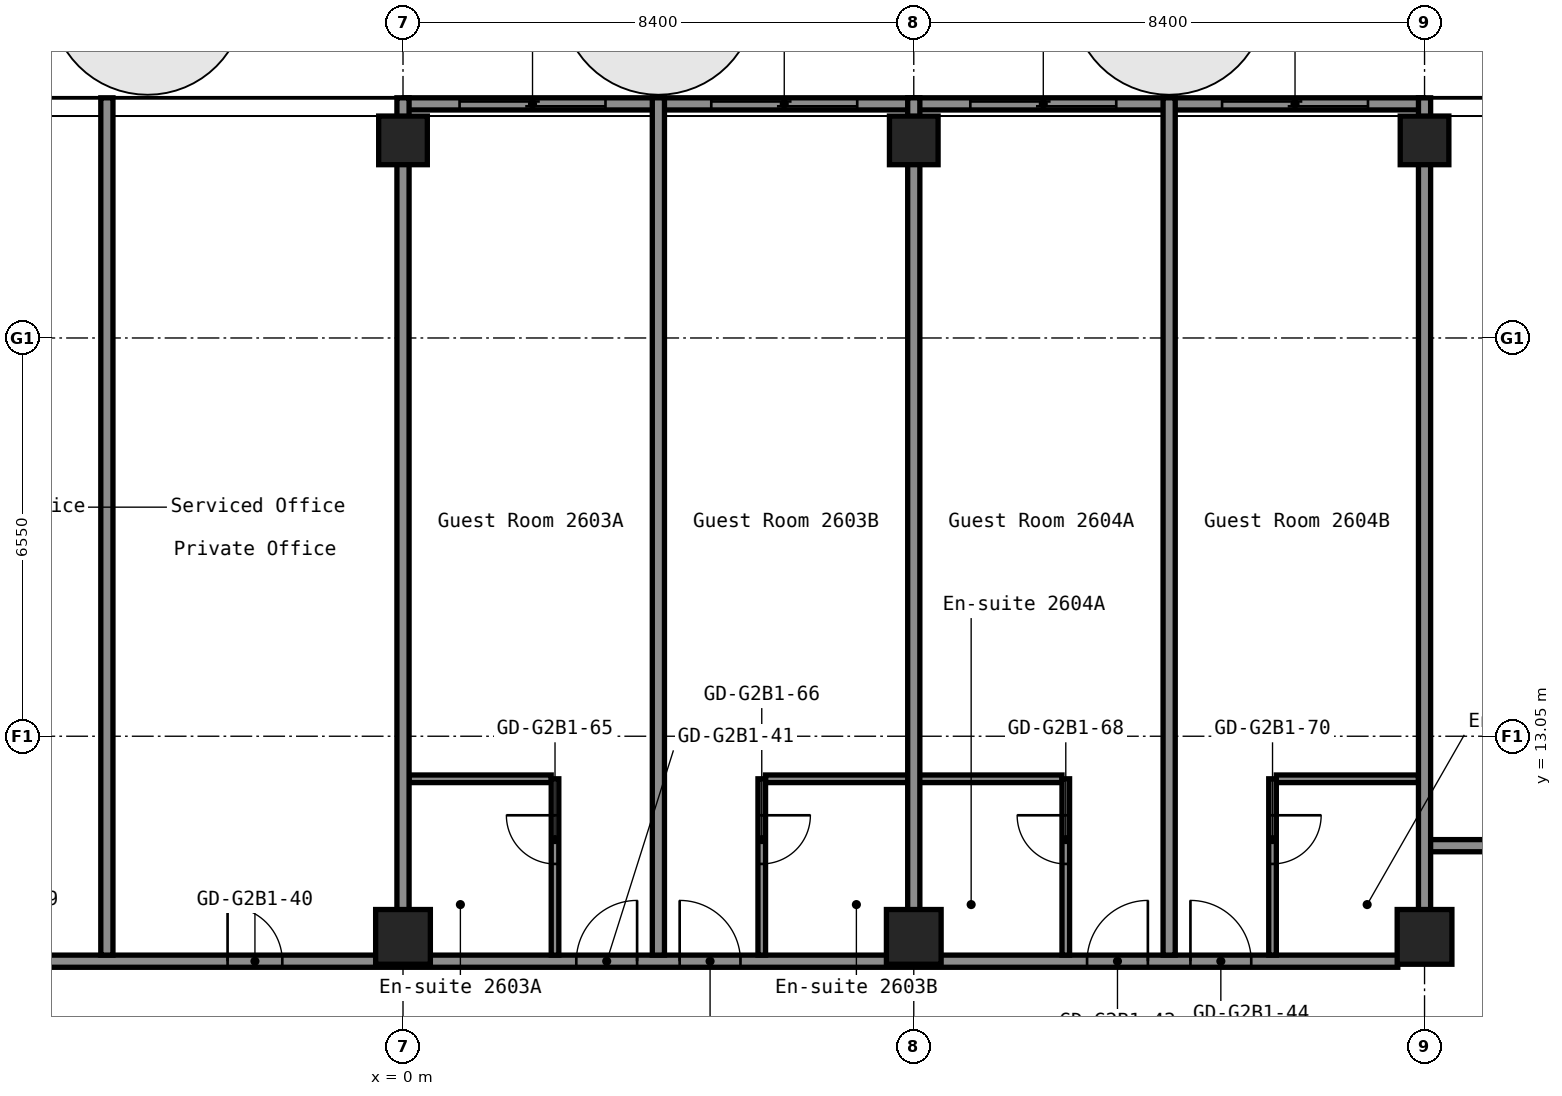
"""IFC4 building model, lengths in metres.
Left out: names, types, materials, properties, quantities, classifications, styles, units other than length and angle.
Written with IfcOpenShell. Run it as: python <this file> out.ifc"""

import sys

from ifc_helpers import new_model, si_unit, direction, frame, frame_2d, origin, origin_2d, place, context, subcontext, project, spatial, rectangle, hollow_rectangle, extrude, element, fill, save


model = new_model("IFC4")
c1 = context("Model", 3, precision=1e-05, world=origin(), true_north=direction((0.0, 1.0)))
c2 = subcontext(c1, "Body", "Model", "MODEL_VIEW")
j1 = project(units=[si_unit("LENGTHUNIT", "METRE"), si_unit("PLANEANGLEUNIT", "RADIAN")], contexts=[c1])
p1 = place(None, origin())
s1 = spatial("IfcSite", under=j1, at=p1, CompositionType="ELEMENT")
p2 = place(p1, origin())
s2 = spatial("IfcBuilding", under=s1, at=p2, CompositionType="ELEMENT")
p3 = place(p2, frame((0.0, 0.0, 94.6)))
s3 = spatial("IfcBuildingStorey", under=s2, at=p3, CompositionType="ELEMENT", Elevation=94.6)
p4 = place(p3, frame((0.0, 9.75, 0.0), z_axis=(0.0, 0.0, 1.0), x_axis=(1.0, 0.0, 0.0)))
e1 = element("IfcColumn", 1, at=p4, inside=s3, PredefinedType="COLUMN", context=c2, shape_type="SweptSolid", body=[
    extrude(hollow_rectangle(XDim=0.9, YDim=0.9, WallThickness=0.036, at=origin_2d()), origin(), (0.0, 0.0, 1.0), 2.8),
])
p5 = place(p3, frame((0.0, 22.85, 0.0), z_axis=(0.0, 0.0, 1.0), x_axis=(1.0, 0.0, 0.0)))
e2 = element("IfcColumn", 2, at=p5, inside=s3, PredefinedType="COLUMN", context=c2, shape_type="SweptSolid", body=[
    extrude(hollow_rectangle(XDim=0.8, YDim=0.8, WallThickness=0.032, at=origin_2d()), origin(), (0.0, 0.0, 1.0), 2.8),
])
p6 = place(p3, frame((8.4, 9.75, 0.0), z_axis=(0.0, 0.0, 1.0), x_axis=(1.0, 0.0, 0.0)))
e3 = element("IfcColumn", 3, at=p6, inside=s3, PredefinedType="COLUMN", context=c2, shape_type="SweptSolid", body=[
    extrude(hollow_rectangle(XDim=0.9, YDim=0.9, WallThickness=0.036, at=origin_2d()), origin(), (0.0, 0.0, 1.0), 2.8),
])
p7 = place(p3, frame((8.4, 22.85, 0.0), z_axis=(0.0, 0.0, 1.0), x_axis=(1.0, 0.0, 0.0)))
e4 = element("IfcColumn", 4, at=p7, inside=s3, PredefinedType="COLUMN", context=c2, shape_type="SweptSolid", body=[
    extrude(hollow_rectangle(XDim=0.8, YDim=0.8, WallThickness=0.032, at=origin_2d()), origin(), (0.0, 0.0, 1.0), 2.8),
])
p8 = place(p3, frame((16.8, 9.75, 0.0), z_axis=(0.0, 0.0, 1.0), x_axis=(1.0, 0.0, 0.0)))
e5 = element("IfcColumn", 5, at=p8, inside=s3, PredefinedType="COLUMN", context=c2, shape_type="SweptSolid", body=[
    extrude(hollow_rectangle(XDim=0.9, YDim=0.9, WallThickness=0.036, at=origin_2d()), origin(), (0.0, 0.0, 1.0), 2.8),
])
p9 = place(p3, frame((16.8, 22.85, 0.0), z_axis=(0.0, 0.0, 1.0), x_axis=(1.0, 0.0, 0.0)))
e6 = element("IfcColumn", 6, at=p9, inside=s3, PredefinedType="COLUMN", context=c2, shape_type="SweptSolid", body=[
    extrude(hollow_rectangle(XDim=0.8, YDim=0.8, WallThickness=0.032, at=origin_2d()), origin(), (0.0, 0.0, 1.0), 2.8),
])
p10 = place(p3, frame((-16.36, 9.35, 0.0), z_axis=(0.0, 0.0, 1.0), x_axis=(1.0, 0.0, 0.0)))
e7 = element("IfcWall", 7, at=p10, inside=s3, PredefinedType="PARTITIONING", context=c2, shape_type="SweptSolid", body=[
    extrude(rectangle(XDim=32.72, YDim=0.2, at=frame_2d((16.36, 0.0))), origin(), (0.0, 0.0, 1.0), 2.8),
])
p11 = place(p10, frame((1.8, 0.0, 0.0)))
e8 = element("IfcOpeningElement", 8, at=p11, cuts=e7, PredefinedType="OPENING", context=c2, shape_type="SweptSolid", body=[
    extrude(rectangle(XDim=0.9, YDim=2.1, at=frame_2d((0.45, 1.05))), frame((0.0, 0.11, 0.0), z_axis=(0.0, -1.0, 0.0), x_axis=(1.0, 0.0, 0.0)), (0.0, 0.0, 1.0), 0.22),
])
p12 = place(p10, frame((6.0, 0.0, 0.0)))
e9 = element("IfcOpeningElement", 9, at=p12, cuts=e7, PredefinedType="OPENING", context=c2, shape_type="SweptSolid", body=[
    extrude(rectangle(XDim=0.9, YDim=2.1, at=frame_2d((0.45, 1.05))), frame((0.0, 0.11, 0.0), z_axis=(0.0, -1.0, 0.0), x_axis=(1.0, 0.0, 0.0)), (0.0, 0.0, 1.0), 0.22),
])
p13 = place(p10, frame((9.275, 0.0, 0.0)))
e10 = element("IfcOpeningElement", 10, at=p13, cuts=e7, PredefinedType="OPENING", context=c2, shape_type="SweptSolid", body=[
    extrude(rectangle(XDim=0.9, YDim=2.1, at=frame_2d((0.45, 1.05))), frame((0.0, 0.11, 0.0), z_axis=(0.0, -1.0, 0.0), x_axis=(1.0, 0.0, 0.0)), (0.0, 0.0, 1.0), 0.22),
])
p14 = place(p10, frame((13.475, 0.0, 0.0)))
e11 = element("IfcOpeningElement", 11, at=p14, cuts=e7, PredefinedType="OPENING", context=c2, shape_type="SweptSolid", body=[
    extrude(rectangle(XDim=0.9, YDim=2.1, at=frame_2d((0.45, 1.05))), frame((0.0, 0.11, 0.0), z_axis=(0.0, -1.0, 0.0), x_axis=(1.0, 0.0, 0.0)), (0.0, 0.0, 1.0), 0.22),
])
p15 = place(p10, frame((19.21, 0.0, 0.0)))
e12 = element("IfcOpeningElement", 12, at=p15, cuts=e7, PredefinedType="OPENING", context=c2, shape_type="SweptSolid", body=[
    extrude(rectangle(XDim=1.0, YDim=2.1, at=frame_2d((0.5, 1.05))), frame((0.0, 0.11, 0.0), z_axis=(0.0, -1.0, 0.0), x_axis=(1.0, 0.0, 0.0)), (0.0, 0.0, 1.0), 0.22),
])
p16 = place(p10, frame((20.91, 0.0, 0.0)))
e13 = element("IfcOpeningElement", 13, at=p16, cuts=e7, PredefinedType="OPENING", context=c2, shape_type="SweptSolid", body=[
    extrude(rectangle(XDim=1.0, YDim=2.1, at=frame_2d((0.5, 1.05))), frame((0.0, 0.11, 0.0), z_axis=(0.0, -1.0, 0.0), x_axis=(1.0, 0.0, 0.0)), (0.0, 0.0, 1.0), 0.22),
])
p17 = place(p10, frame((27.61, 0.0, 0.0)))
e14 = element("IfcOpeningElement", 14, at=p17, cuts=e7, PredefinedType="OPENING", context=c2, shape_type="SweptSolid", body=[
    extrude(rectangle(XDim=1.0, YDim=2.1, at=frame_2d((0.5, 1.05))), frame((0.0, 0.11, 0.0), z_axis=(0.0, -1.0, 0.0), x_axis=(1.0, 0.0, 0.0)), (0.0, 0.0, 1.0), 0.22),
])
p18 = place(p10, frame((29.31, 0.0, 0.0)))
e15 = element("IfcOpeningElement", 15, at=p18, cuts=e7, PredefinedType="OPENING", context=c2, shape_type="SweptSolid", body=[
    extrude(rectangle(XDim=1.0, YDim=2.1, at=frame_2d((0.5, 1.05))), frame((0.0, 0.11, 0.0), z_axis=(0.0, -1.0, 0.0), x_axis=(1.0, 0.0, 0.0)), (0.0, 0.0, 1.0), 0.22),
])
p19 = place(p3, frame((16.8, 11.25, 0.0), z_axis=(0.0, 0.0, 1.0), x_axis=(1.0, 0.0, 0.0)))
e16 = element("IfcWall", 16, at=p19, inside=s3, PredefinedType="PARTITIONING", context=c2, shape_type="SweptSolid", body=[
    extrude(rectangle(XDim=29.7, YDim=0.2, at=frame_2d((14.85, 0.0))), origin(), (0.0, 0.0, 1.0), 2.8),
])
p20 = place(p19, frame((3.4, 0.0, 0.0)))
e17 = element("IfcOpeningElement", 17, at=p20, cuts=e16, PredefinedType="OPENING", context=c2, shape_type="SweptSolid", body=[
    extrude(rectangle(XDim=1.6, YDim=2.1, at=frame_2d((0.8, 1.05))), frame((0.0, 0.11, 0.0), z_axis=(0.0, -1.0, 0.0), x_axis=(1.0, 0.0, 0.0)), (0.0, 0.0, 1.0), 0.22),
])
p21 = place(p19, frame((11.8, 0.0, 0.0)))
e18 = element("IfcOpeningElement", 18, at=p21, cuts=e16, PredefinedType="OPENING", context=c2, shape_type="SweptSolid", body=[
    extrude(rectangle(XDim=1.6, YDim=2.1, at=frame_2d((0.8, 1.05))), frame((0.0, 0.11, 0.0), z_axis=(0.0, -1.0, 0.0), x_axis=(1.0, 0.0, 0.0)), (0.0, 0.0, 1.0), 0.22),
])
p22 = place(p19, frame((20.2, 0.0, 0.0)))
e19 = element("IfcOpeningElement", 19, at=p22, cuts=e16, PredefinedType="OPENING", context=c2, shape_type="SweptSolid", body=[
    extrude(rectangle(XDim=1.6, YDim=2.1, at=frame_2d((0.8, 1.05))), frame((0.0, 0.11, 0.0), z_axis=(0.0, -1.0, 0.0), x_axis=(1.0, 0.0, 0.0)), (0.0, 0.0, 1.0), 0.22),
])
p23 = place(p19, frame((26.85, 0.0, 0.0)))
e20 = element("IfcOpeningElement", 20, at=p23, cuts=e16, PredefinedType="OPENING", context=c2, shape_type="SweptSolid", body=[
    extrude(rectangle(XDim=0.9, YDim=2.1, at=frame_2d((0.45, 1.05))), frame((0.0, 0.11, 0.0), z_axis=(0.0, -1.0, 0.0), x_axis=(1.0, 0.0, 0.0)), (0.0, 0.0, 1.0), 0.22),
])
p24 = place(p3, frame((0.1, 12.35, 0.0), z_axis=(0.0, 0.0, 1.0), x_axis=(1.0, 0.0, 0.0)))
e21 = element("IfcWall", 21, at=p24, inside=s3, PredefinedType="PARTITIONING", context=c2, shape_type="SweptSolid", body=[
    extrude(rectangle(XDim=2.337, YDim=0.125, at=frame_2d((1.169, 0.0))), origin(), (0.0, 0.0, 1.0), 2.8),
])
p25 = place(p3, frame((5.962, 12.35, 0.0), z_axis=(0.0, 0.0, 1.0), x_axis=(1.0, 0.0, 0.0)))
e22 = element("IfcWall", 22, at=p25, inside=s3, PredefinedType="PARTITIONING", context=c2, shape_type="SweptSolid", body=[
    extrude(rectangle(XDim=4.875, YDim=0.125, at=frame_2d((2.438, 0.0))), origin(), (0.0, 0.0, 1.0), 2.8),
])
p26 = place(p3, frame((14.363, 12.35, 0.0), z_axis=(0.0, 0.0, 1.0), x_axis=(1.0, 0.0, 0.0)))
e23 = element("IfcWall", 23, at=p26, inside=s3, PredefinedType="PARTITIONING", context=c2, shape_type="SweptSolid", body=[
    extrude(rectangle(XDim=2.337, YDim=0.125, at=frame_2d((1.169, 0.0))), origin(), (0.0, 0.0, 1.0), 2.8),
])
p27 = place(p3, frame((-4.87, 9.45, 0.0), z_axis=(0.0, 0.0, 1.0), x_axis=(0.0, 1.0, 0.0)))
e24 = element("IfcWall", 24, at=p27, inside=s3, PredefinedType="PARTITIONING", context=c2, shape_type="SweptSolid", body=[
    extrude(rectangle(XDim=14.1, YDim=0.2, at=frame_2d((7.05, 0.0))), origin(), (0.0, 0.0, 1.0), 2.8),
])
p28 = place(p3, frame((0.0, 10.19, 0.0), z_axis=(0.0, 0.0, 1.0), x_axis=(0.0, 1.0, 0.0)))
e25 = element("IfcWall", 25, at=p28, inside=s3, PredefinedType="PARTITIONING", context=c2, shape_type="SweptSolid", body=[
    extrude(rectangle(XDim=13.36, YDim=0.2, at=frame_2d((6.68, 0.0))), origin(), (0.0, 0.0, 1.0), 2.8),
])
p29 = place(p3, frame((2.5, 9.45, 0.0), z_axis=(0.0, 0.0, 1.0), x_axis=(0.0, 1.0, 0.0)))
e26 = element("IfcWall", 26, at=p29, inside=s3, PredefinedType="PARTITIONING", context=c2, shape_type="SweptSolid", body=[
    extrude(rectangle(XDim=2.9, YDim=0.125, at=frame_2d((1.45, 0.0))), origin(), (0.0, 0.0, 1.0), 2.8),
])
p30 = place(p29, frame((1.5, 0.0, 0.0)))
e27 = element("IfcOpeningElement", 27, at=p30, cuts=e26, PredefinedType="OPENING", context=c2, shape_type="SweptSolid", body=[
    extrude(rectangle(XDim=0.8, YDim=2.1, at=frame_2d((0.4, 1.05))), frame((0.0, 0.073, 0.0), z_axis=(0.0, -1.0, 0.0), x_axis=(1.0, 0.0, 0.0)), (0.0, 0.0, 1.0), 0.145),
])
p31 = place(p3, frame((4.2, 9.45, 0.0), z_axis=(0.0, 0.0, 1.0), x_axis=(0.0, 1.0, 0.0)))
e28 = element("IfcWall", 28, at=p31, inside=s3, PredefinedType="PARTITIONING", context=c2, shape_type="SweptSolid", body=[
    extrude(rectangle(XDim=14.1, YDim=0.2, at=frame_2d((7.05, 0.0))), origin(), (0.0, 0.0, 1.0), 2.8),
])
p32 = place(p3, frame((5.9, 9.45, 0.0), z_axis=(0.0, 0.0, 1.0), x_axis=(0.0, 1.0, 0.0)))
e29 = element("IfcWall", 29, at=p32, inside=s3, PredefinedType="PARTITIONING", context=c2, shape_type="SweptSolid", body=[
    extrude(rectangle(XDim=2.9, YDim=0.125, at=frame_2d((1.45, 0.0))), origin(), (0.0, 0.0, 1.0), 2.8),
])
p33 = place(p32, frame((1.5, 0.0, 0.0)))
e30 = element("IfcOpeningElement", 30, at=p33, cuts=e29, PredefinedType="OPENING", context=c2, shape_type="SweptSolid", body=[
    extrude(rectangle(XDim=0.8, YDim=2.1, at=frame_2d((0.4, 1.05))), frame((0.0, 0.073, 0.0), z_axis=(0.0, -1.0, 0.0), x_axis=(1.0, 0.0, 0.0)), (0.0, 0.0, 1.0), 0.145),
])
p34 = place(p3, frame((8.4, 10.19, 0.0), z_axis=(0.0, 0.0, 1.0), x_axis=(0.0, 1.0, 0.0)))
e31 = element("IfcWall", 31, at=p34, inside=s3, PredefinedType="PARTITIONING", context=c2, shape_type="SweptSolid", body=[
    extrude(rectangle(XDim=13.36, YDim=0.2, at=frame_2d((6.68, 0.0))), origin(), (0.0, 0.0, 1.0), 2.8),
])
p35 = place(p3, frame((10.9, 9.45, 0.0), z_axis=(0.0, 0.0, 1.0), x_axis=(0.0, 1.0, 0.0)))
e32 = element("IfcWall", 32, at=p35, inside=s3, PredefinedType="PARTITIONING", context=c2, shape_type="SweptSolid", body=[
    extrude(rectangle(XDim=2.9, YDim=0.125, at=frame_2d((1.45, 0.0))), origin(), (0.0, 0.0, 1.0), 2.8),
])
p36 = place(p35, frame((1.5, 0.0, 0.0)))
e33 = element("IfcOpeningElement", 33, at=p36, cuts=e32, PredefinedType="OPENING", context=c2, shape_type="SweptSolid", body=[
    extrude(rectangle(XDim=0.8, YDim=2.1, at=frame_2d((0.4, 1.05))), frame((0.0, 0.073, 0.0), z_axis=(0.0, -1.0, 0.0), x_axis=(1.0, 0.0, 0.0)), (0.0, 0.0, 1.0), 0.145),
])
p37 = place(p3, frame((12.6, 9.45, 0.0), z_axis=(0.0, 0.0, 1.0), x_axis=(0.0, 1.0, 0.0)))
e34 = element("IfcWall", 34, at=p37, inside=s3, PredefinedType="PARTITIONING", context=c2, shape_type="SweptSolid", body=[
    extrude(rectangle(XDim=14.1, YDim=0.2, at=frame_2d((7.05, 0.0))), origin(), (0.0, 0.0, 1.0), 2.8),
])
p38 = place(p3, frame((14.3, 9.45, 0.0), z_axis=(0.0, 0.0, 1.0), x_axis=(0.0, 1.0, 0.0)))
e35 = element("IfcWall", 35, at=p38, inside=s3, PredefinedType="PARTITIONING", context=c2, shape_type="SweptSolid", body=[
    extrude(rectangle(XDim=2.9, YDim=0.125, at=frame_2d((1.45, 0.0))), origin(), (0.0, 0.0, 1.0), 2.8),
])
p39 = place(p38, frame((1.5, 0.0, 0.0)))
e36 = element("IfcOpeningElement", 36, at=p39, cuts=e35, PredefinedType="OPENING", context=c2, shape_type="SweptSolid", body=[
    extrude(rectangle(XDim=0.8, YDim=2.1, at=frame_2d((0.4, 1.05))), frame((0.0, 0.073, 0.0), z_axis=(0.0, -1.0, 0.0), x_axis=(1.0, 0.0, 0.0)), (0.0, 0.0, 1.0), 0.145),
])
p40 = place(p3, frame((16.8, 10.19, 0.0), z_axis=(0.0, 0.0, 1.0), x_axis=(0.0, 1.0, 0.0)))
e37 = element("IfcWall", 37, at=p40, inside=s3, PredefinedType="PARTITIONING", context=c2, shape_type="SweptSolid", body=[
    extrude(rectangle(XDim=13.36, YDim=0.2, at=frame_2d((6.68, 0.0))), origin(), (0.0, 0.0, 1.0), 2.8),
])
p41 = place(p3, frame((16.78, 23.45, 0.0), z_axis=(0.0, 0.0, 1.0), x_axis=(-1.0, 0.0, 0.0)))
p42 = place(p41, frame((0.91, 0.0, 0.0)))
p43 = place(p42, frame((2.4, 0.0, 0.0), z_axis=(0.0, 0.0, 1.0), x_axis=(-1.0, 0.0, 0.0)))
e38 = element("IfcDoor", 38, at=p43, inside=s3, OperationType="SLIDING_TO_LEFT", PredefinedType="DOOR", context=c2, shape_type="SweptSolid", body=[
    extrude(rectangle(XDim=2.4, YDim=2.2, at=frame_2d((1.2, 1.1))), frame((0.0, 0.025, 0.0), z_axis=(0.0, -1.0, 0.0), x_axis=(1.0, 0.0, 0.0)), (0.0, 0.0, 1.0), 0.05),
])
p44 = place(p3, frame((12.64, 23.45, 0.0), z_axis=(0.0, 0.0, 1.0), x_axis=(-1.0, 0.0, 0.0)))
p45 = place(p44, frame((0.91, 0.0, 0.0)))
p46 = place(p45, frame((2.4, 0.0, 0.0), z_axis=(0.0, 0.0, 1.0), x_axis=(-1.0, 0.0, 0.0)))
e39 = element("IfcDoor", 39, at=p46, inside=s3, OperationType="SLIDING_TO_LEFT", PredefinedType="DOOR", context=c2, shape_type="SweptSolid", body=[
    extrude(rectangle(XDim=2.4, YDim=2.2, at=frame_2d((1.2, 1.1))), frame((0.0, 0.025, 0.0), z_axis=(0.0, -1.0, 0.0), x_axis=(1.0, 0.0, 0.0)), (0.0, 0.0, 1.0), 0.05),
])
p47 = place(p3, frame((8.38, 23.45, 0.0), z_axis=(0.0, 0.0, 1.0), x_axis=(-1.0, 0.0, 0.0)))
p48 = place(p47, frame((0.91, 0.0, 0.0)))
p49 = place(p48, frame((2.4, 0.0, 0.0), z_axis=(0.0, 0.0, 1.0), x_axis=(-1.0, 0.0, 0.0)))
e40 = element("IfcDoor", 40, at=p49, inside=s3, OperationType="SLIDING_TO_LEFT", PredefinedType="DOOR", context=c2, shape_type="SweptSolid", body=[
    extrude(rectangle(XDim=2.4, YDim=2.2, at=frame_2d((1.2, 1.1))), frame((0.0, 0.025, 0.0), z_axis=(0.0, -1.0, 0.0), x_axis=(1.0, 0.0, 0.0)), (0.0, 0.0, 1.0), 0.05),
])
p50 = place(p3, frame((4.24, 23.45, 0.0), z_axis=(0.0, 0.0, 1.0), x_axis=(-1.0, 0.0, 0.0)))
p51 = place(p50, frame((0.91, 0.0, 0.0)))
p52 = place(p51, frame((2.4, 0.0, 0.0), z_axis=(0.0, 0.0, 1.0), x_axis=(-1.0, 0.0, 0.0)))
e41 = element("IfcDoor", 41, at=p52, inside=s3, OperationType="SLIDING_TO_LEFT", PredefinedType="DOOR", context=c2, shape_type="SweptSolid", body=[
    extrude(rectangle(XDim=2.4, YDim=2.2, at=frame_2d((1.2, 1.1))), frame((0.0, 0.025, 0.0), z_axis=(0.0, -1.0, 0.0), x_axis=(1.0, 0.0, 0.0)), (0.0, 0.0, 1.0), 0.05),
])
p53 = place(p14, origin())
e42 = element("IfcDoor", 42, at=p53, inside=s3, OperationType="SINGLE_SWING_RIGHT", PredefinedType="DOOR", context=c2, shape_type="SweptSolid", body=[
    extrude(rectangle(XDim=0.9, YDim=2.1, at=frame_2d((0.45, 1.05))), frame((0.0, 0.025, 0.0), z_axis=(0.0, -1.0, 0.0), x_axis=(1.0, 0.0, 0.0)), (0.0, 0.0, 1.0), 0.05),
])
fill(e11, e42)
p54 = place(p15, origin())
e43 = element("IfcDoor", 43, at=p54, inside=s3, OperationType="SINGLE_SWING_LEFT", PredefinedType="DOOR", context=c2, shape_type="SweptSolid", body=[
    extrude(rectangle(XDim=1.0, YDim=2.1, at=frame_2d((0.5, 1.05))), frame((0.0, 0.025, 0.0), z_axis=(0.0, -1.0, 0.0), x_axis=(1.0, 0.0, 0.0)), (0.0, 0.0, 1.0), 0.05),
])
fill(e12, e43)
p55 = place(p16, origin())
e44 = element("IfcDoor", 44, at=p55, inside=s3, OperationType="SINGLE_SWING_RIGHT", PredefinedType="DOOR", context=c2, shape_type="SweptSolid", body=[
    extrude(rectangle(XDim=1.0, YDim=2.1, at=frame_2d((0.5, 1.05))), frame((0.0, 0.025, 0.0), z_axis=(0.0, -1.0, 0.0), x_axis=(1.0, 0.0, 0.0)), (0.0, 0.0, 1.0), 0.05),
])
fill(e13, e44)
p56 = place(p17, origin())
e45 = element("IfcDoor", 45, at=p56, inside=s3, OperationType="SINGLE_SWING_LEFT", PredefinedType="DOOR", context=c2, shape_type="SweptSolid", body=[
    extrude(rectangle(XDim=1.0, YDim=2.1, at=frame_2d((0.5, 1.05))), frame((0.0, 0.025, 0.0), z_axis=(0.0, -1.0, 0.0), x_axis=(1.0, 0.0, 0.0)), (0.0, 0.0, 1.0), 0.05),
])
fill(e14, e45)
p57 = place(p18, origin())
e46 = element("IfcDoor", 46, at=p57, inside=s3, OperationType="SINGLE_SWING_RIGHT", PredefinedType="DOOR", context=c2, shape_type="SweptSolid", body=[
    extrude(rectangle(XDim=1.0, YDim=2.1, at=frame_2d((0.5, 1.05))), frame((0.0, 0.025, 0.0), z_axis=(0.0, -1.0, 0.0), x_axis=(1.0, 0.0, 0.0)), (0.0, 0.0, 1.0), 0.05),
])
fill(e15, e46)
p58 = place(p30, origin())
e47 = element("IfcDoor", 47, at=p58, inside=s3, OperationType="SINGLE_SWING_LEFT", PredefinedType="DOOR", context=c2, shape_type="SweptSolid", body=[
    extrude(rectangle(XDim=0.8, YDim=2.1, at=frame_2d((0.4, 1.05))), frame((0.0, 0.025, 0.0), z_axis=(0.0, -1.0, 0.0), x_axis=(1.0, 0.0, 0.0)), (0.0, 0.0, 1.0), 0.05),
])
fill(e27, e47)
p59 = place(p33, origin())
e48 = element("IfcDoor", 48, at=p59, inside=s3, OperationType="SINGLE_SWING_RIGHT", PredefinedType="DOOR", context=c2, shape_type="SweptSolid", body=[
    extrude(rectangle(XDim=0.8, YDim=2.1, at=frame_2d((0.4, 1.05))), frame((0.0, 0.025, 0.0), z_axis=(0.0, -1.0, 0.0), x_axis=(1.0, 0.0, 0.0)), (0.0, 0.0, 1.0), 0.05),
])
fill(e30, e48)
p60 = place(p36, origin())
e49 = element("IfcDoor", 49, at=p60, inside=s3, OperationType="SINGLE_SWING_LEFT", PredefinedType="DOOR", context=c2, shape_type="SweptSolid", body=[
    extrude(rectangle(XDim=0.8, YDim=2.1, at=frame_2d((0.4, 1.05))), frame((0.0, 0.025, 0.0), z_axis=(0.0, -1.0, 0.0), x_axis=(1.0, 0.0, 0.0)), (0.0, 0.0, 1.0), 0.05),
])
fill(e33, e49)
p61 = place(p39, origin())
e50 = element("IfcDoor", 50, at=p61, inside=s3, OperationType="SINGLE_SWING_RIGHT", PredefinedType="DOOR", context=c2, shape_type="SweptSolid", body=[
    extrude(rectangle(XDim=0.8, YDim=2.1, at=frame_2d((0.4, 1.05))), frame((0.0, 0.025, 0.0), z_axis=(0.0, -1.0, 0.0), x_axis=(1.0, 0.0, 0.0)), (0.0, 0.0, 1.0), 0.05),
])
fill(e36, e50)
save(model, sys.argv[1])
